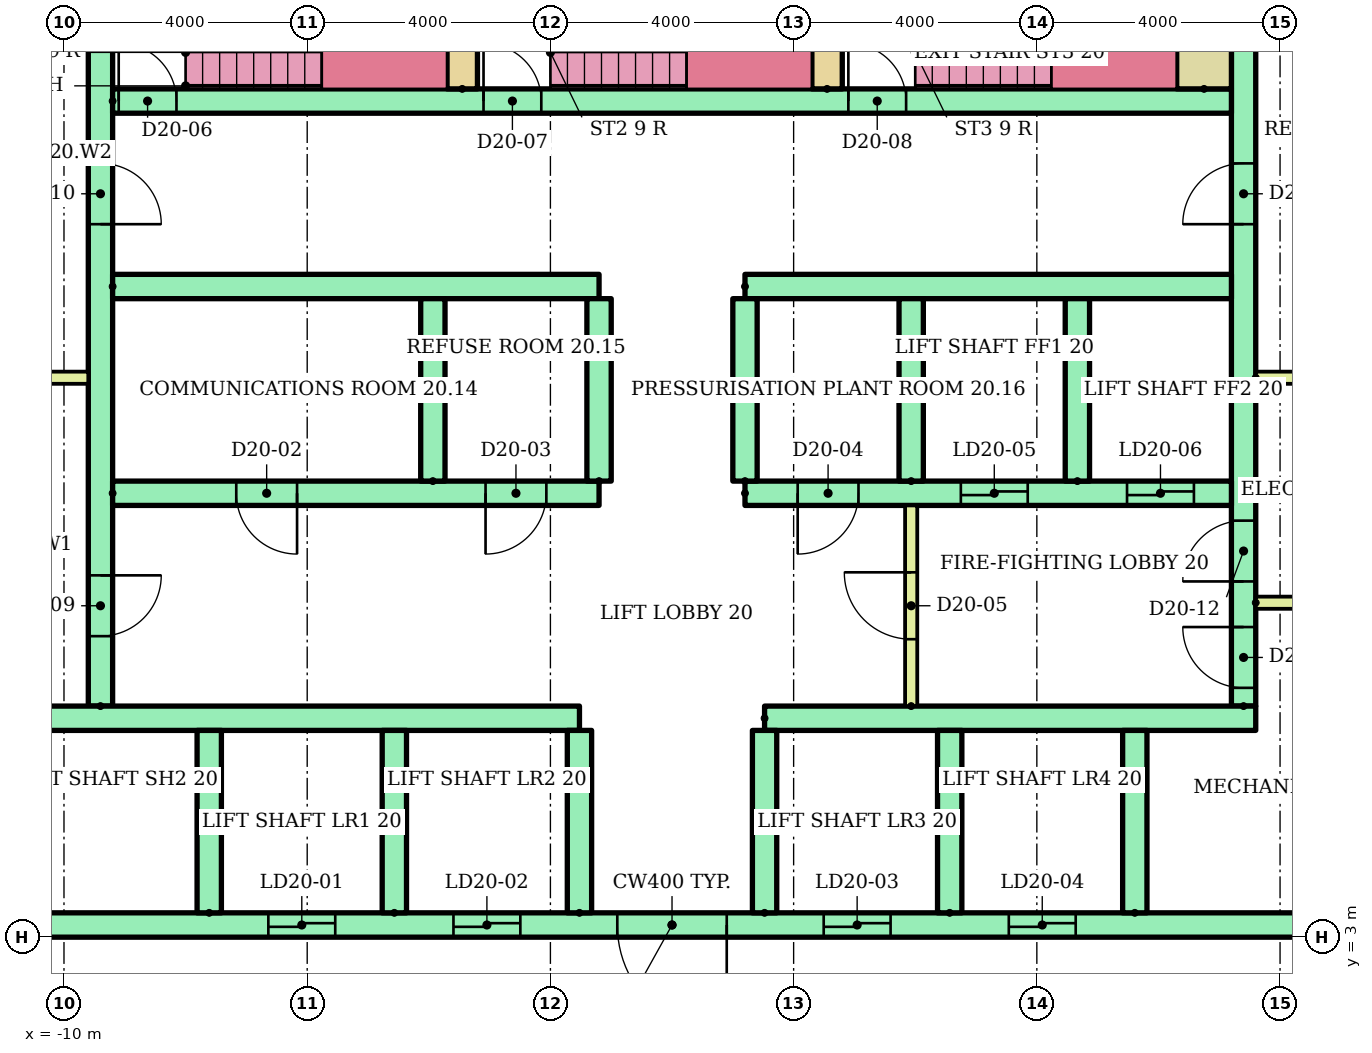
"""IFC4 building model, lengths in metres.
Left out: names, types, materials, properties, quantities, classifications, styles, units other than length and angle.
Written with IfcOpenShell. Run it as: python <this file> out.ifc"""

import sys

from ifc_helpers import new_model, si_unit, direction, frame, frame_2d, origin, place, context, subcontext, project, spatial, rectangle, extrude, element, fill, save


model = new_model("IFC4")
c1 = context("Model", 3, precision=1e-05, world=origin(), true_north=direction((0.0, 1.0)))
c2 = subcontext(c1, "Body", "Model", "MODEL_VIEW")
j1 = project(units=[si_unit("LENGTHUNIT", "METRE"), si_unit("PLANEANGLEUNIT", "RADIAN")], contexts=[c1])
p1 = place(None, origin())
s1 = spatial("IfcSite", under=j1, at=p1, CompositionType="ELEMENT")
p2 = place(p1, origin())
s2 = spatial("IfcBuilding", under=s1, at=p2, CompositionType="ELEMENT")
p3 = place(p2, frame((0.0, 0.0, 80.7)))
s3 = spatial("IfcBuildingStorey", under=s2, at=p3, CompositionType="ELEMENT", Elevation=80.7)
p4 = place(p3, frame((-9.4, 6.8, 0.0), z_axis=(0.0, 0.0, 1.0), x_axis=(0.0, 1.0, 0.0)))
e1 = element("IfcWall", 1, at=p4, inside=s3, PredefinedType="SHEAR", context=c2, shape_type="SweptSolid", body=[
    extrude(rectangle(XDim=12.7, YDim=0.4, at=frame_2d((6.35, 0.0))), origin(), (0.0, 0.0, 1.0), 2.92),
])
p5 = place(p4, frame((1.15, 0.0, 0.0)))
e2 = element("IfcOpeningElement", 2, at=p5, cuts=e1, PredefinedType="OPENING", context=c2, shape_type="SweptSolid", body=[
    extrude(rectangle(XDim=1.0, YDim=2.1, at=frame_2d((0.5, 1.05))), frame((0.0, 0.21, 0.0), z_axis=(0.0, -1.0, 0.0), x_axis=(1.0, 0.0, 0.0)), (0.0, 0.0, 1.0), 0.42),
])
p6 = place(p4, frame((7.925, 0.0, 0.0)))
e3 = element("IfcOpeningElement", 3, at=p6, cuts=e1, PredefinedType="OPENING", context=c2, shape_type="SweptSolid", body=[
    extrude(rectangle(XDim=1.0, YDim=2.1, at=frame_2d((0.5, 1.05))), frame((0.0, 0.21, 0.0), z_axis=(0.0, -1.0, 0.0), x_axis=(1.0, 0.0, 0.0)), (0.0, 0.0, 1.0), 0.42),
])
p7 = place(p3, frame((9.4, 6.8, 0.0), z_axis=(0.0, 0.0, 1.0), x_axis=(0.0, 1.0, 0.0)))
e4 = element("IfcWall", 4, at=p7, inside=s3, PredefinedType="SHEAR", context=c2, shape_type="SweptSolid", body=[
    extrude(rectangle(XDim=12.7, YDim=0.4, at=frame_2d((6.35, 0.0))), origin(), (0.0, 0.0, 1.0), 2.92),
])
p8 = place(p7, frame((0.3, 0.0, 0.0)))
e5 = element("IfcOpeningElement", 5, at=p8, cuts=e4, PredefinedType="OPENING", context=c2, shape_type="SweptSolid", body=[
    extrude(rectangle(XDim=1.0, YDim=2.1, at=frame_2d((0.5, 1.05))), frame((0.0, 0.21, 0.0), z_axis=(0.0, -1.0, 0.0), x_axis=(1.0, 0.0, 0.0)), (0.0, 0.0, 1.0), 0.42),
])
p9 = place(p7, frame((2.05, 0.0, 0.0)))
e6 = element("IfcOpeningElement", 6, at=p9, cuts=e4, PredefinedType="OPENING", context=c2, shape_type="SweptSolid", body=[
    extrude(rectangle(XDim=1.0, YDim=2.1, at=frame_2d((0.5, 1.05))), frame((0.0, 0.21, 0.0), z_axis=(0.0, -1.0, 0.0), x_axis=(1.0, 0.0, 0.0)), (0.0, 0.0, 1.0), 0.42),
])
p10 = place(p7, frame((7.925, 0.0, 0.0)))
e7 = element("IfcOpeningElement", 7, at=p10, cuts=e4, PredefinedType="OPENING", context=c2, shape_type="SweptSolid", body=[
    extrude(rectangle(XDim=1.0, YDim=2.1, at=frame_2d((0.5, 1.05))), frame((0.0, 0.21, 0.0), z_axis=(0.0, -1.0, 0.0), x_axis=(1.0, 0.0, 0.0)), (0.0, 0.0, 1.0), 0.42),
])
p11 = place(p3, frame((-13.5, 3.2, 0.0)))
e8 = element("IfcWall", 8, at=p11, inside=s3, PredefinedType="SHEAR", context=c2, shape_type="SweptSolid", body=[
    extrude(rectangle(XDim=27.0, YDim=0.4, at=frame_2d((13.5, 0.0))), origin(), (0.0, 0.0, 1.0), 2.92),
])
p12 = place(p11, frame((6.861, 0.0, 0.0)))
e9 = element("IfcOpeningElement", 9, at=p12, cuts=e8, PredefinedType="OPENING", context=c2, shape_type="SweptSolid", body=[
    extrude(rectangle(XDim=1.1, YDim=2.1, at=frame_2d((0.55, 1.05))), frame((0.0, 0.21, 0.0), z_axis=(0.0, -1.0, 0.0), x_axis=(1.0, 0.0, 0.0)), (0.0, 0.0, 1.0), 0.42),
])
p13 = place(p11, frame((9.906, 0.0, 0.0)))
e10 = element("IfcOpeningElement", 10, at=p13, cuts=e8, PredefinedType="OPENING", context=c2, shape_type="SweptSolid", body=[
    extrude(rectangle(XDim=1.1, YDim=2.1, at=frame_2d((0.55, 1.05))), frame((0.0, 0.21, 0.0), z_axis=(0.0, -1.0, 0.0), x_axis=(1.0, 0.0, 0.0)), (0.0, 0.0, 1.0), 0.42),
])
p14 = place(p11, frame((15.994, 0.0, 0.0)))
e11 = element("IfcOpeningElement", 11, at=p14, cuts=e8, PredefinedType="OPENING", context=c2, shape_type="SweptSolid", body=[
    extrude(rectangle(XDim=1.1, YDim=2.1, at=frame_2d((0.55, 1.05))), frame((0.0, 0.21, 0.0), z_axis=(0.0, -1.0, 0.0), x_axis=(1.0, 0.0, 0.0)), (0.0, 0.0, 1.0), 0.42),
])
p15 = place(p11, frame((19.039, 0.0, 0.0)))
e12 = element("IfcOpeningElement", 12, at=p15, cuts=e8, PredefinedType="OPENING", context=c2, shape_type="SweptSolid", body=[
    extrude(rectangle(XDim=1.1, YDim=2.1, at=frame_2d((0.55, 1.05))), frame((0.0, 0.21, 0.0), z_axis=(0.0, -1.0, 0.0), x_axis=(1.0, 0.0, 0.0)), (0.0, 0.0, 1.0), 0.42),
])
p16 = place(p11, frame((12.6, 0.0, 0.0)))
e13 = element("IfcOpeningElement", 13, at=p16, cuts=e8, PredefinedType="OPENING", context=c2, shape_type="SweptSolid", body=[
    extrude(rectangle(XDim=1.8, YDim=2.1, at=frame_2d((0.9, 1.05))), frame((0.0, 0.21, 0.0), z_axis=(0.0, -1.0, 0.0), x_axis=(1.0, 0.0, 0.0)), (0.0, 0.0, 1.0), 0.42),
])
p17 = place(p3, frame((-13.5, 6.6, 0.0)))
e14 = element("IfcWall", 14, at=p17, inside=s3, PredefinedType="SHEAR", context=c2, shape_type="SweptSolid", body=[
    extrude(rectangle(XDim=11.978, YDim=0.4, at=frame_2d((5.989, 0.0))), origin(), (0.0, 0.0, 1.0), 2.92),
])
p18 = place(p3, frame((1.522, 6.6, 0.0)))
e15 = element("IfcWall", 15, at=p18, inside=s3, PredefinedType="SHEAR", context=c2, shape_type="SweptSolid", body=[
    extrude(rectangle(XDim=8.078, YDim=0.4, at=frame_2d((4.039, 0.0))), origin(), (0.0, 0.0, 1.0), 2.92),
])
for number, where, z_axis, x_axis in (
    (16, (-7.611, 3.4, 0.0), (0.0, 0.0, 1.0), (0.0, 1.0, 0.0)),
    (17, (-4.567, 3.4, 0.0), (0.0, 0.0, 1.0), (0.0, 1.0, 0.0)),
    (18, (-1.522, 3.4, 0.0), (0.0, 0.0, 1.0), (0.0, 1.0, 0.0)),
    (19, (1.522, 3.4, 0.0), (0.0, 0.0, 1.0), (0.0, 1.0, 0.0)),
    (20, (4.567, 3.4, 0.0), (0.0, 0.0, 1.0), (0.0, 1.0, 0.0)),
    (21, (7.611, 3.4, 0.0), (0.0, 0.0, 1.0), (0.0, 1.0, 0.0)),
):
    element("IfcWall", number, at=place(p3, frame(where, z_axis=z_axis, x_axis=x_axis)), inside=s3, PredefinedType="SHEAR", context=c2, shape_type="SweptSolid", body=[
        extrude(rectangle(XDim=3.0, YDim=0.4, at=frame_2d((1.5, 0.0))), origin(), (0.0, 0.0, 1.0), 2.92),
    ])
p19 = place(p3, frame((-9.2, 10.3, 0.0)))
e22 = element("IfcWall", 22, at=p19, inside=s3, PredefinedType="SHEAR", context=c2, shape_type="SweptSolid", body=[
    extrude(rectangle(XDim=8.0, YDim=0.4, at=frame_2d((4.0, 0.0))), origin(), (0.0, 0.0, 1.0), 2.92),
])
p20 = place(p19, frame((2.033, 0.0, 0.0)))
e23 = element("IfcOpeningElement", 23, at=p20, cuts=e22, PredefinedType="OPENING", context=c2, shape_type="SweptSolid", body=[
    extrude(rectangle(XDim=1.0, YDim=2.1, at=frame_2d((0.5, 1.05))), frame((0.0, 0.21, 0.0), z_axis=(0.0, -1.0, 0.0), x_axis=(1.0, 0.0, 0.0)), (0.0, 0.0, 1.0), 0.42),
])
p21 = place(p19, frame((6.133, 0.0, 0.0)))
e24 = element("IfcOpeningElement", 24, at=p21, cuts=e22, PredefinedType="OPENING", context=c2, shape_type="SweptSolid", body=[
    extrude(rectangle(XDim=1.0, YDim=2.1, at=frame_2d((0.5, 1.05))), frame((0.0, 0.21, 0.0), z_axis=(0.0, -1.0, 0.0), x_axis=(1.0, 0.0, 0.0)), (0.0, 0.0, 1.0), 0.42),
])
p22 = place(p3, frame((-9.2, 13.7, 0.0)))
e25 = element("IfcWall", 25, at=p22, inside=s3, PredefinedType="SHEAR", context=c2, shape_type="SweptSolid", body=[
    extrude(rectangle(XDim=8.0, YDim=0.4, at=frame_2d((4.0, 0.0))), origin(), (0.0, 0.0, 1.0), 2.92),
])
p23 = place(p3, frame((1.2, 10.3, 0.0)))
e26 = element("IfcWall", 26, at=p23, inside=s3, PredefinedType="SHEAR", context=c2, shape_type="SweptSolid", body=[
    extrude(rectangle(XDim=8.0, YDim=0.4, at=frame_2d((4.0, 0.0))), origin(), (0.0, 0.0, 1.0), 2.92),
])
p24 = place(p23, frame((3.55, 0.0, 0.0)))
e27 = element("IfcOpeningElement", 27, at=p24, cuts=e26, PredefinedType="OPENING", context=c2, shape_type="SweptSolid", body=[
    extrude(rectangle(XDim=1.1, YDim=2.1, at=frame_2d((0.55, 1.05))), frame((0.0, 0.21, 0.0), z_axis=(0.0, -1.0, 0.0), x_axis=(1.0, 0.0, 0.0)), (0.0, 0.0, 1.0), 0.42),
])
p25 = place(p23, frame((6.283, 0.0, 0.0)))
e28 = element("IfcOpeningElement", 28, at=p25, cuts=e26, PredefinedType="OPENING", context=c2, shape_type="SweptSolid", body=[
    extrude(rectangle(XDim=1.1, YDim=2.1, at=frame_2d((0.55, 1.05))), frame((0.0, 0.21, 0.0), z_axis=(0.0, -1.0, 0.0), x_axis=(1.0, 0.0, 0.0)), (0.0, 0.0, 1.0), 0.42),
])
p26 = place(p23, frame((0.867, 0.0, 0.0)))
e29 = element("IfcOpeningElement", 29, at=p26, cuts=e26, PredefinedType="OPENING", context=c2, shape_type="SweptSolid", body=[
    extrude(rectangle(XDim=1.0, YDim=2.1, at=frame_2d((0.5, 1.05))), frame((0.0, 0.21, 0.0), z_axis=(0.0, -1.0, 0.0), x_axis=(1.0, 0.0, 0.0)), (0.0, 0.0, 1.0), 0.42),
])
p27 = place(p3, frame((1.2, 13.7, 0.0)))
e30 = element("IfcWall", 30, at=p27, inside=s3, PredefinedType="SHEAR", context=c2, shape_type="SweptSolid", body=[
    extrude(rectangle(XDim=8.0, YDim=0.4, at=frame_2d((4.0, 0.0))), origin(), (0.0, 0.0, 1.0), 2.92),
])
for number, where, z_axis, x_axis in (
    (31, (-3.933, 10.5, 0.0), (0.0, 0.0, 1.0), (0.0, 1.0, 0.0)),
    (32, (-1.2, 10.5, 0.0), (0.0, 0.0, 1.0), (0.0, 1.0, 0.0)),
    (33, (1.2, 10.5, 0.0), (0.0, 0.0, 1.0), (0.0, 1.0, 0.0)),
    (34, (3.933, 10.5, 0.0), (0.0, 0.0, 1.0), (0.0, 1.0, 0.0)),
    (35, (6.667, 10.5, 0.0), (0.0, 0.0, 1.0), (0.0, 1.0, 0.0)),
):
    element("IfcWall", number, at=place(p3, frame(where, z_axis=z_axis, x_axis=x_axis)), inside=s3, PredefinedType="SHEAR", context=c2, shape_type="SweptSolid", body=[
        extrude(rectangle(XDim=3.0, YDim=0.4, at=frame_2d((1.5, 0.0))), origin(), (0.0, 0.0, 1.0), 2.92),
    ])
p28 = place(p3, frame((3.933, 6.8, 0.0), z_axis=(0.0, 0.0, 1.0), x_axis=(0.0, 1.0, 0.0)))
e36 = element("IfcWall", 36, at=p28, inside=s3, PredefinedType="PARTITIONING", context=c2, shape_type="SweptSolid", body=[
    extrude(rectangle(XDim=3.3, YDim=0.2, at=frame_2d((1.65, 0.0))), origin(), (0.0, 0.0, 1.0), 2.92),
])
p29 = place(p28, frame((1.1, 0.0, 0.0)))
e37 = element("IfcOpeningElement", 37, at=p29, cuts=e36, PredefinedType="OPENING", context=c2, shape_type="SweptSolid", body=[
    extrude(rectangle(XDim=1.1, YDim=2.1, at=frame_2d((0.55, 1.05))), frame((0.0, 0.11, 0.0), z_axis=(0.0, -1.0, 0.0), x_axis=(1.0, 0.0, 0.0)), (0.0, 0.0, 1.0), 0.22),
])
p30 = place(p3, frame((-9.2, 16.75, 0.0)))
e38 = element("IfcWall", 38, at=p30, inside=s3, PredefinedType="SHEAR", context=c2, shape_type="SweptSolid", body=[
    extrude(rectangle(XDim=18.4, YDim=0.4, at=frame_2d((9.2, 0.0))), origin(), (0.0, 0.0, 1.0), 2.92),
])
p31 = place(p30, frame((0.1, 0.0, 0.0)))
e39 = element("IfcOpeningElement", 39, at=p31, cuts=e38, PredefinedType="OPENING", context=c2, shape_type="SweptSolid", body=[
    extrude(rectangle(XDim=0.95, YDim=2.1, at=frame_2d((0.475, 1.05))), frame((0.0, 0.21, 0.0), z_axis=(0.0, -1.0, 0.0), x_axis=(1.0, 0.0, 0.0)), (0.0, 0.0, 1.0), 0.42),
])
p32 = place(p30, frame((6.1, 0.0, 0.0)))
e40 = element("IfcOpeningElement", 40, at=p32, cuts=e38, PredefinedType="OPENING", context=c2, shape_type="SweptSolid", body=[
    extrude(rectangle(XDim=0.95, YDim=2.1, at=frame_2d((0.475, 1.05))), frame((0.0, 0.21, 0.0), z_axis=(0.0, -1.0, 0.0), x_axis=(1.0, 0.0, 0.0)), (0.0, 0.0, 1.0), 0.42),
])
p33 = place(p30, frame((12.1, 0.0, 0.0)))
e41 = element("IfcOpeningElement", 41, at=p33, cuts=e38, PredefinedType="OPENING", context=c2, shape_type="SweptSolid", body=[
    extrude(rectangle(XDim=0.95, YDim=2.1, at=frame_2d((0.475, 1.05))), frame((0.0, 0.21, 0.0), z_axis=(0.0, -1.0, 0.0), x_axis=(1.0, 0.0, 0.0)), (0.0, 0.0, 1.0), 0.42),
])
for number, where, z_axis, x_axis in (
    (42, (-3.45, 16.95, 0.0), (0.0, 0.0, 1.0), (0.0, 1.0, 0.0)),
    (43, (2.55, 16.95, 0.0), (0.0, 0.0, 1.0), (0.0, 1.0, 0.0)),
):
    element("IfcWall", number, at=place(p3, frame(where, z_axis=z_axis, x_axis=x_axis)), inside=s3, PredefinedType="SHEAR", context=c2, shape_type="SweptSolid", body=[
        extrude(rectangle(XDim=2.55, YDim=0.5, at=frame_2d((1.275, 0.0))), origin(), (0.0, 0.0, 1.0), 2.92),
    ])
p34 = place(p3, frame((8.75, 16.95, 0.0), z_axis=(0.0, 0.0, 1.0), x_axis=(0.0, 1.0, 0.0)))
e44 = element("IfcWall", 44, at=p34, inside=s3, PredefinedType="SHEAR", context=c2, shape_type="SweptSolid", body=[
    extrude(rectangle(XDim=2.55, YDim=0.9, at=frame_2d((1.275, 0.0))), origin(), (0.0, 0.0, 1.0), 2.92),
])
for number, where in (
    (45, (-13.5, 12.2, 0.0)),
    (46, (9.6, 8.5, 0.0)),
    (47, (9.6, 12.2, 0.0)),
):
    element("IfcWall", number, at=place(p3, frame(where)), inside=s3, PredefinedType="PARTITIONING", context=c2, shape_type="SweptSolid", body=[
        extrude(rectangle(XDim=3.9, YDim=0.2, at=frame_2d((1.95, 0.0))), origin(), (0.0, 0.0, 1.0), 2.92),
    ])
p35 = place(p12, origin())
e48 = element("IfcDoor", 48, at=p35, inside=s3, OperationType="SLIDING_TO_LEFT", PredefinedType="DOOR", context=c2, shape_type="SweptSolid", body=[
    extrude(rectangle(XDim=1.1, YDim=2.1, at=frame_2d((0.55, 1.05))), frame((0.0, 0.025, 0.0), z_axis=(0.0, -1.0, 0.0), x_axis=(1.0, 0.0, 0.0)), (0.0, 0.0, 1.0), 0.05),
])
fill(e9, e48)
p36 = place(p13, origin())
e49 = element("IfcDoor", 49, at=p36, inside=s3, OperationType="SLIDING_TO_LEFT", PredefinedType="DOOR", context=c2, shape_type="SweptSolid", body=[
    extrude(rectangle(XDim=1.1, YDim=2.1, at=frame_2d((0.55, 1.05))), frame((0.0, 0.025, 0.0), z_axis=(0.0, -1.0, 0.0), x_axis=(1.0, 0.0, 0.0)), (0.0, 0.0, 1.0), 0.05),
])
fill(e10, e49)
p37 = place(p14, origin())
e50 = element("IfcDoor", 50, at=p37, inside=s3, OperationType="SLIDING_TO_LEFT", PredefinedType="DOOR", context=c2, shape_type="SweptSolid", body=[
    extrude(rectangle(XDim=1.1, YDim=2.1, at=frame_2d((0.55, 1.05))), frame((0.0, 0.025, 0.0), z_axis=(0.0, -1.0, 0.0), x_axis=(1.0, 0.0, 0.0)), (0.0, 0.0, 1.0), 0.05),
])
fill(e11, e50)
p38 = place(p15, origin())
e51 = element("IfcDoor", 51, at=p38, inside=s3, OperationType="SLIDING_TO_LEFT", PredefinedType="DOOR", context=c2, shape_type="SweptSolid", body=[
    extrude(rectangle(XDim=1.1, YDim=2.1, at=frame_2d((0.55, 1.05))), frame((0.0, 0.025, 0.0), z_axis=(0.0, -1.0, 0.0), x_axis=(1.0, 0.0, 0.0)), (0.0, 0.0, 1.0), 0.05),
])
fill(e12, e51)
p39 = place(p16, frame((1.8, 0.0, 0.0), z_axis=(0.0, 0.0, 1.0), x_axis=(-1.0, 0.0, 0.0)))
e52 = element("IfcDoor", 52, at=p39, inside=s3, OperationType="DOUBLE_DOOR_SINGLE_SWING", PredefinedType="DOOR", context=c2, shape_type="SweptSolid", body=[
    extrude(rectangle(XDim=1.8, YDim=2.1, at=frame_2d((0.9, 1.05))), frame((0.0, 0.025, 0.0), z_axis=(0.0, -1.0, 0.0), x_axis=(1.0, 0.0, 0.0)), (0.0, 0.0, 1.0), 0.05),
])
fill(e13, e52)
p40 = place(p24, origin())
e53 = element("IfcDoor", 53, at=p40, inside=s3, OperationType="SLIDING_TO_LEFT", PredefinedType="DOOR", context=c2, shape_type="SweptSolid", body=[
    extrude(rectangle(XDim=1.1, YDim=2.1, at=frame_2d((0.55, 1.05))), frame((0.0, 0.025, 0.0), z_axis=(0.0, -1.0, 0.0), x_axis=(1.0, 0.0, 0.0)), (0.0, 0.0, 1.0), 0.05),
])
fill(e27, e53)
p41 = place(p25, origin())
e54 = element("IfcDoor", 54, at=p41, inside=s3, OperationType="SLIDING_TO_LEFT", PredefinedType="DOOR", context=c2, shape_type="SweptSolid", body=[
    extrude(rectangle(XDim=1.1, YDim=2.1, at=frame_2d((0.55, 1.05))), frame((0.0, 0.025, 0.0), z_axis=(0.0, -1.0, 0.0), x_axis=(1.0, 0.0, 0.0)), (0.0, 0.0, 1.0), 0.05),
])
fill(e28, e54)
p42 = place(p20, frame((1.0, 0.0, 0.0), z_axis=(0.0, 0.0, 1.0), x_axis=(-1.0, 0.0, 0.0)))
e55 = element("IfcDoor", 55, at=p42, inside=s3, OperationType="SINGLE_SWING_RIGHT", PredefinedType="DOOR", context=c2, shape_type="SweptSolid", body=[
    extrude(rectangle(XDim=1.0, YDim=2.1, at=frame_2d((0.5, 1.05))), frame((0.0, 0.025, 0.0), z_axis=(0.0, -1.0, 0.0), x_axis=(1.0, 0.0, 0.0)), (0.0, 0.0, 1.0), 0.05),
])
fill(e23, e55)
p43 = place(p21, frame((1.0, 0.0, 0.0), z_axis=(0.0, 0.0, 1.0), x_axis=(-1.0, 0.0, 0.0)))
e56 = element("IfcDoor", 56, at=p43, inside=s3, OperationType="SINGLE_SWING_LEFT", PredefinedType="DOOR", context=c2, shape_type="SweptSolid", body=[
    extrude(rectangle(XDim=1.0, YDim=2.1, at=frame_2d((0.5, 1.05))), frame((0.0, 0.025, 0.0), z_axis=(0.0, -1.0, 0.0), x_axis=(1.0, 0.0, 0.0)), (0.0, 0.0, 1.0), 0.05),
])
fill(e24, e56)
p44 = place(p26, frame((1.0, 0.0, 0.0), z_axis=(0.0, 0.0, 1.0), x_axis=(-1.0, 0.0, 0.0)))
e57 = element("IfcDoor", 57, at=p44, inside=s3, OperationType="SINGLE_SWING_LEFT", PredefinedType="DOOR", context=c2, shape_type="SweptSolid", body=[
    extrude(rectangle(XDim=1.0, YDim=2.1, at=frame_2d((0.5, 1.05))), frame((0.0, 0.025, 0.0), z_axis=(0.0, -1.0, 0.0), x_axis=(1.0, 0.0, 0.0)), (0.0, 0.0, 1.0), 0.05),
])
fill(e29, e57)
p45 = place(p29, origin())
e58 = element("IfcDoor", 58, at=p45, inside=s3, OperationType="SINGLE_SWING_RIGHT", PredefinedType="DOOR", context=c2, shape_type="SweptSolid", body=[
    extrude(rectangle(XDim=1.1, YDim=2.1, at=frame_2d((0.55, 1.05))), frame((0.0, 0.025, 0.0), z_axis=(0.0, -1.0, 0.0), x_axis=(1.0, 0.0, 0.0)), (0.0, 0.0, 1.0), 0.05),
])
fill(e37, e58)
p46 = place(p31, origin())
e59 = element("IfcDoor", 59, at=p46, inside=s3, OperationType="SINGLE_SWING_LEFT", PredefinedType="DOOR", context=c2, shape_type="SweptSolid", body=[
    extrude(rectangle(XDim=0.95, YDim=2.1, at=frame_2d((0.475, 1.05))), frame((0.0, 0.025, 0.0), z_axis=(0.0, -1.0, 0.0), x_axis=(1.0, 0.0, 0.0)), (0.0, 0.0, 1.0), 0.05),
])
fill(e39, e59)
p47 = place(p32, origin())
e60 = element("IfcDoor", 60, at=p47, inside=s3, OperationType="SINGLE_SWING_LEFT", PredefinedType="DOOR", context=c2, shape_type="SweptSolid", body=[
    extrude(rectangle(XDim=0.95, YDim=2.1, at=frame_2d((0.475, 1.05))), frame((0.0, 0.025, 0.0), z_axis=(0.0, -1.0, 0.0), x_axis=(1.0, 0.0, 0.0)), (0.0, 0.0, 1.0), 0.05),
])
fill(e40, e60)
p48 = place(p33, origin())
e61 = element("IfcDoor", 61, at=p48, inside=s3, OperationType="SINGLE_SWING_LEFT", PredefinedType="DOOR", context=c2, shape_type="SweptSolid", body=[
    extrude(rectangle(XDim=0.95, YDim=2.1, at=frame_2d((0.475, 1.05))), frame((0.0, 0.025, 0.0), z_axis=(0.0, -1.0, 0.0), x_axis=(1.0, 0.0, 0.0)), (0.0, 0.0, 1.0), 0.05),
])
fill(e41, e61)
p49 = place(p5, frame((1.0, 0.0, 0.0), z_axis=(0.0, 0.0, 1.0), x_axis=(-1.0, 0.0, 0.0)))
e62 = element("IfcDoor", 62, at=p49, inside=s3, OperationType="SINGLE_SWING_RIGHT", PredefinedType="DOOR", context=c2, shape_type="SweptSolid", body=[
    extrude(rectangle(XDim=1.0, YDim=2.1, at=frame_2d((0.5, 1.05))), frame((0.0, 0.025, 0.0), z_axis=(0.0, -1.0, 0.0), x_axis=(1.0, 0.0, 0.0)), (0.0, 0.0, 1.0), 0.05),
])
fill(e2, e62)
p50 = place(p6, frame((1.0, 0.0, 0.0), z_axis=(0.0, 0.0, 1.0), x_axis=(-1.0, 0.0, 0.0)))
e63 = element("IfcDoor", 63, at=p50, inside=s3, OperationType="SINGLE_SWING_LEFT", PredefinedType="DOOR", context=c2, shape_type="SweptSolid", body=[
    extrude(rectangle(XDim=1.0, YDim=2.1, at=frame_2d((0.5, 1.05))), frame((0.0, 0.025, 0.0), z_axis=(0.0, -1.0, 0.0), x_axis=(1.0, 0.0, 0.0)), (0.0, 0.0, 1.0), 0.05),
])
fill(e3, e63)
p51 = place(p8, origin())
e64 = element("IfcDoor", 64, at=p51, inside=s3, OperationType="SINGLE_SWING_RIGHT", PredefinedType="DOOR", context=c2, shape_type="SweptSolid", body=[
    extrude(rectangle(XDim=1.0, YDim=2.1, at=frame_2d((0.5, 1.05))), frame((0.0, 0.025, 0.0), z_axis=(0.0, -1.0, 0.0), x_axis=(1.0, 0.0, 0.0)), (0.0, 0.0, 1.0), 0.05),
])
fill(e5, e64)
p52 = place(p9, origin())
e65 = element("IfcDoor", 65, at=p52, inside=s3, OperationType="SINGLE_SWING_LEFT", PredefinedType="DOOR", context=c2, shape_type="SweptSolid", body=[
    extrude(rectangle(XDim=1.0, YDim=2.1, at=frame_2d((0.5, 1.05))), frame((0.0, 0.025, 0.0), z_axis=(0.0, -1.0, 0.0), x_axis=(1.0, 0.0, 0.0)), (0.0, 0.0, 1.0), 0.05),
])
fill(e6, e65)
p53 = place(p10, origin())
e66 = element("IfcDoor", 66, at=p53, inside=s3, OperationType="SINGLE_SWING_LEFT", PredefinedType="DOOR", context=c2, shape_type="SweptSolid", body=[
    extrude(rectangle(XDim=1.0, YDim=2.1, at=frame_2d((0.5, 1.05))), frame((0.0, 0.025, 0.0), z_axis=(0.0, -1.0, 0.0), x_axis=(1.0, 0.0, 0.0)), (0.0, 0.0, 1.0), 0.05),
])
fill(e7, e66)
save(model, sys.argv[1])
